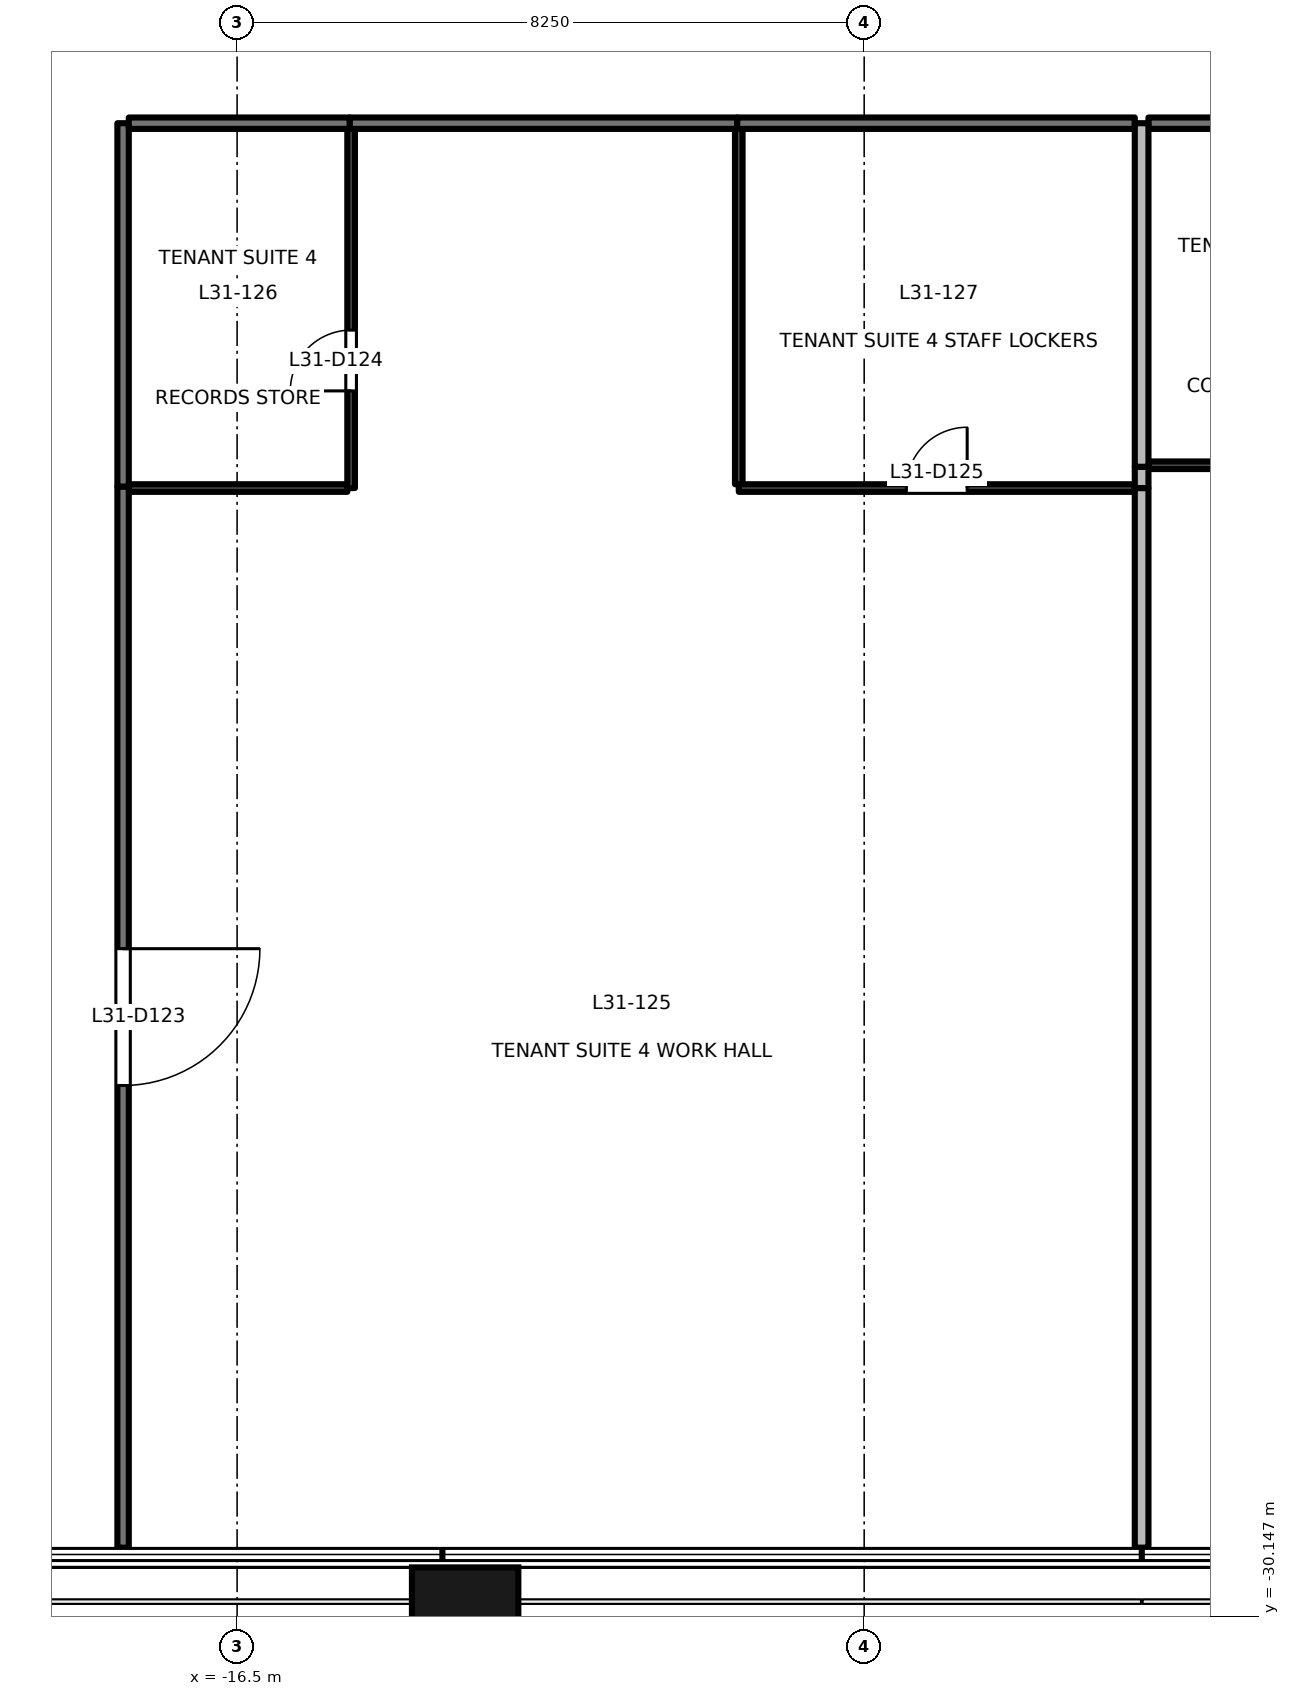
"""IFC4 building model, lengths in metres.
Left out: names, types, materials, properties, quantities, classifications, styles, units other than length and angle.
Written with IfcOpenShell. Run it as: python <this file> out.ifc"""

import sys

from ifc_helpers import new_model, si_unit, direction, frame, frame_2d, origin, origin_2d, place, context, subcontext, project, spatial, rectangle, extrude, element, fill, save


model = new_model("IFC4")
c1 = context("Model", 3, precision=1e-05, world=origin(), true_north=direction((0.0, 1.0)))
c2 = subcontext(c1, "Body", "Model", "MODEL_VIEW")
j1 = project(units=[si_unit("LENGTHUNIT", "METRE"), si_unit("PLANEANGLEUNIT", "RADIAN")], contexts=[c1])
p1 = place(None, origin())
s1 = spatial("IfcSite", under=j1, at=p1, CompositionType="ELEMENT")
p2 = place(p1, origin())
s2 = spatial("IfcBuilding", under=s1, at=p2, CompositionType="ELEMENT")
p3 = place(p2, frame((0.0, 0.0, 138.1)))
s3 = spatial("IfcBuildingStorey", under=s2, at=p3, CompositionType="ELEMENT", Elevation=138.1)
p4 = place(p3, frame((-13.5, -30.4, -0.2), z_axis=(0.0, 0.0, 1.0), x_axis=(1.0, 0.0, 0.0)))
e1 = element("IfcColumn", 1, at=p4, inside=s3, PredefinedType="COLUMN", context=c2, shape_type="SweptSolid", body=[
    extrude(rectangle(XDim=1.4, YDim=1.8, at=origin_2d()), origin(), (0.0, 0.0, 1.0), 4.0),
])
p5 = place(p3, frame((-18.0, -15.28, 0.0), z_axis=(0.0, 0.0, 1.0), x_axis=(0.0, -1.0, 0.0)))
e2 = element("IfcWall", 2, at=p5, inside=s3, PredefinedType="PARTITIONING", context=c2, shape_type="SweptSolid", body=[
    extrude(rectangle(XDim=13.96, YDim=0.15, at=frame_2d((6.98, 0.0))), origin(), (0.0, 0.0, 1.0), 3.8),
])
p6 = place(p5, frame((6.08, 0.0, 0.0)))
e3 = element("IfcOpeningElement", 3, at=p6, cuts=e2, PredefinedType="OPENING", context=c2, shape_type="SweptSolid", body=[
    extrude(rectangle(XDim=1.8, YDim=2.1, at=frame_2d((0.9, 1.05))), frame((0.0, 0.085, 0.0), z_axis=(0.0, -1.0, 0.0), x_axis=(1.0, 0.0, 0.0)), (0.0, 0.0, 1.0), 0.171),
])
p7 = place(p3, frame((-9.92, -10.5, 0.0), z_axis=(0.0, 0.0, 1.0), x_axis=(-1.0, 0.0, 0.0)))
e4 = element("IfcWall", 4, at=p7, inside=s3, PredefinedType="PARTITIONING", context=c2, shape_type="SweptSolid", body=[
    extrude(rectangle(XDim=5.1, YDim=0.15, at=frame_2d((2.55, 0.0))), origin(), (0.0, 0.0, 1.0), 2.9),
])
p8 = place(p3, frame((-18.0, -10.5, 0.0), z_axis=(0.0, 0.0, 1.0), x_axis=(0.0, -1.0, 0.0)))
e5 = element("IfcWall", 5, at=p8, inside=s3, PredefinedType="PARTITIONING", context=c2, shape_type="SweptSolid", body=[
    extrude(rectangle(XDim=4.78, YDim=0.15, at=frame_2d((2.39, 0.0))), origin(), (0.0, 0.0, 1.0), 3.8),
])
p9 = place(p3, frame((-15.02, -10.5, 0.0), z_axis=(0.0, 0.0, 1.0), x_axis=(-1.0, 0.0, 0.0)))
e6 = element("IfcWall", 6, at=p9, inside=s3, PredefinedType="PARTITIONING", context=c2, shape_type="SweptSolid", body=[
    extrude(rectangle(XDim=2.905, YDim=0.15, at=frame_2d((1.453, 0.0))), origin(), (0.0, 0.0, 1.0), 3.8),
])
p10 = place(p3, frame((-4.69, -10.5, 0.0), z_axis=(0.0, 0.0, 1.0), x_axis=(-1.0, 0.0, 0.0)))
e7 = element("IfcWall", 7, at=p10, inside=s3, PredefinedType="PARTITIONING", context=c2, shape_type="SweptSolid", body=[
    extrude(rectangle(XDim=5.23, YDim=0.15, at=frame_2d((2.615, 0.0))), origin(), (0.0, 0.0, 1.0), 2.9),
])
p11 = place(p3, frame((-1.62, -10.5, 0.0), z_axis=(0.0, 0.0, 1.0), x_axis=(-1.0, 0.0, 0.0)))
e8 = element("IfcWall", 8, at=p11, inside=s3, PredefinedType="PARTITIONING", context=c2, shape_type="SweptSolid", body=[
    extrude(rectangle(XDim=2.89, YDim=0.15, at=frame_2d((1.445, 0.0))), origin(), (0.0, 0.0, 1.0), 2.9),
])
p12 = place(p3, frame((-17.925, -15.3, 0.0), z_axis=(0.0, 0.0, 1.0), x_axis=(1.0, 0.0, 0.0)))
e9 = element("IfcWall", 9, at=p12, inside=s3, PredefinedType="PARTITIONING", context=c2, shape_type="SweptSolid", body=[
    extrude(rectangle(XDim=2.875, YDim=0.1, at=frame_2d((1.438, 0.0))), origin(), (0.0, 0.0, 1.0), 3.8),
])
p13 = place(p3, frame((-15.0, -15.3, 0.0), z_axis=(0.0, 0.0, 1.0), x_axis=(0.0, 1.0, 0.0)))
e10 = element("IfcWall", 10, at=p13, inside=s3, PredefinedType="PARTITIONING", context=c2, shape_type="SweptSolid", body=[
    extrude(rectangle(XDim=4.725, YDim=0.1, at=frame_2d((2.363, 0.0))), origin(), (0.0, 0.0, 1.0), 3.8),
])
p14 = place(p13, frame((1.278, 0.0, 0.0)))
e11 = element("IfcOpeningElement", 11, at=p14, cuts=e10, PredefinedType="OPENING", context=c2, shape_type="SweptSolid", body=[
    extrude(rectangle(XDim=0.8, YDim=2.1, at=frame_2d((0.4, 1.05))), frame((0.0, 0.061, 0.0), z_axis=(0.0, -1.0, 0.0), x_axis=(1.0, 0.0, 0.0)), (0.0, 0.0, 1.0), 0.121),
])
p15 = place(p3, frame((-9.9, -10.575, 0.0), z_axis=(0.0, 0.0, 1.0), x_axis=(0.0, -1.0, 0.0)))
e12 = element("IfcWall", 12, at=p15, inside=s3, PredefinedType="PARTITIONING", context=c2, shape_type="SweptSolid", body=[
    extrude(rectangle(XDim=4.675, YDim=0.1, at=frame_2d((2.337, 0.0))), origin(), (0.0, 0.0, 1.0), 3.8),
])
p16 = place(p3, frame((-9.9, -15.3, 0.0), z_axis=(0.0, 0.0, 1.0), x_axis=(1.0, 0.0, 0.0)))
e13 = element("IfcWall", 13, at=p16, inside=s3, PredefinedType="PARTITIONING", context=c2, shape_type="SweptSolid", body=[
    extrude(rectangle(XDim=5.21, YDim=0.1, at=frame_2d((2.605, 0.0))), origin(), (0.0, 0.0, 1.0), 2.9),
])
p17 = place(p16, frame((2.205, 0.0, 0.0)))
e14 = element("IfcOpeningElement", 14, at=p17, cuts=e13, PredefinedType="OPENING", context=c2, shape_type="SweptSolid", body=[
    extrude(rectangle(XDim=0.8, YDim=2.1, at=frame_2d((0.4, 1.05))), frame((0.0, 0.061, 0.0), z_axis=(0.0, -1.0, 0.0), x_axis=(1.0, 0.0, 0.0)), (0.0, 0.0, 1.0), 0.121),
])
p18 = place(p3, frame((-4.6, -15.3, 0.0), z_axis=(0.0, 0.0, 1.0), x_axis=(0.0, -1.0, 0.0)))
e15 = element("IfcWall", 15, at=p18, inside=s3, PredefinedType="PARTITIONING", context=c2, shape_type="SweptSolid", body=[
    extrude(rectangle(XDim=13.94, YDim=0.18, at=frame_2d((6.97, 0.0))), origin(), (0.0, 0.0, 1.0), 2.9),
])
p19 = place(p3, frame((-4.6, -15.02, 0.0), z_axis=(0.0, 0.0, 1.0), x_axis=(0.0, -1.0, 0.0)))
e16 = element("IfcWall", 16, at=p19, inside=s3, PredefinedType="PARTITIONING", context=c2, shape_type="SweptSolid", body=[
    extrude(rectangle(XDim=0.28, YDim=0.18, at=frame_2d((0.14, 0.0))), origin(), (0.0, 0.0, 1.0), 2.9),
])
p20 = place(p3, frame((-4.6, -10.5, 0.0), z_axis=(0.0, 0.0, 1.0), x_axis=(0.0, -1.0, 0.0)))
e17 = element("IfcWall", 17, at=p20, inside=s3, PredefinedType="PARTITIONING", context=c2, shape_type="SweptSolid", body=[
    extrude(rectangle(XDim=4.52, YDim=0.18, at=frame_2d((2.26, 0.0))), origin(), (0.0, 0.0, 1.0), 2.9),
])
p21 = place(p3, frame((-4.51, -15.0, 0.0), z_axis=(0.0, 0.0, 1.0), x_axis=(1.0, 0.0, 0.0)))
e18 = element("IfcWall", 18, at=p21, inside=s3, PredefinedType="PARTITIONING", context=c2, shape_type="SweptSolid", body=[
    extrude(rectangle(XDim=2.86, YDim=0.1, at=frame_2d((1.43, 0.0))), origin(), (0.0, 0.0, 1.0), 2.9),
])
p22 = place(p6, origin())
e19 = element("IfcDoor", 19, at=p22, inside=s3, OperationType="DOUBLE_DOOR_SINGLE_SWING", PredefinedType="DOOR", context=c2, shape_type="SweptSolid", body=[
    extrude(rectangle(XDim=1.8, YDim=2.1, at=frame_2d((0.9, 1.05))), frame((0.0, 0.025, 0.0), z_axis=(0.0, -1.0, 0.0), x_axis=(1.0, 0.0, 0.0)), (0.0, 0.0, 1.0), 0.05),
])
fill(e3, e19)
p23 = place(p14, origin())
e20 = element("IfcDoor", 20, at=p23, inside=s3, OperationType="SINGLE_SWING_LEFT", PredefinedType="DOOR", context=c2, shape_type="SweptSolid", body=[
    extrude(rectangle(XDim=0.8, YDim=2.1, at=frame_2d((0.4, 1.05))), frame((0.0, 0.025, 0.0), z_axis=(0.0, -1.0, 0.0), x_axis=(1.0, 0.0, 0.0)), (0.0, 0.0, 1.0), 0.05),
])
fill(e11, e20)
p24 = place(p17, origin())
e21 = element("IfcDoor", 21, at=p24, inside=s3, OperationType="SINGLE_SWING_RIGHT", PredefinedType="DOOR", context=c2, shape_type="SweptSolid", body=[
    extrude(rectangle(XDim=0.8, YDim=2.1, at=frame_2d((0.4, 1.05))), frame((0.0, 0.025, 0.0), z_axis=(0.0, -1.0, 0.0), x_axis=(1.0, 0.0, 0.0)), (0.0, 0.0, 1.0), 0.05),
])
fill(e14, e21)
save(model, sys.argv[1])
